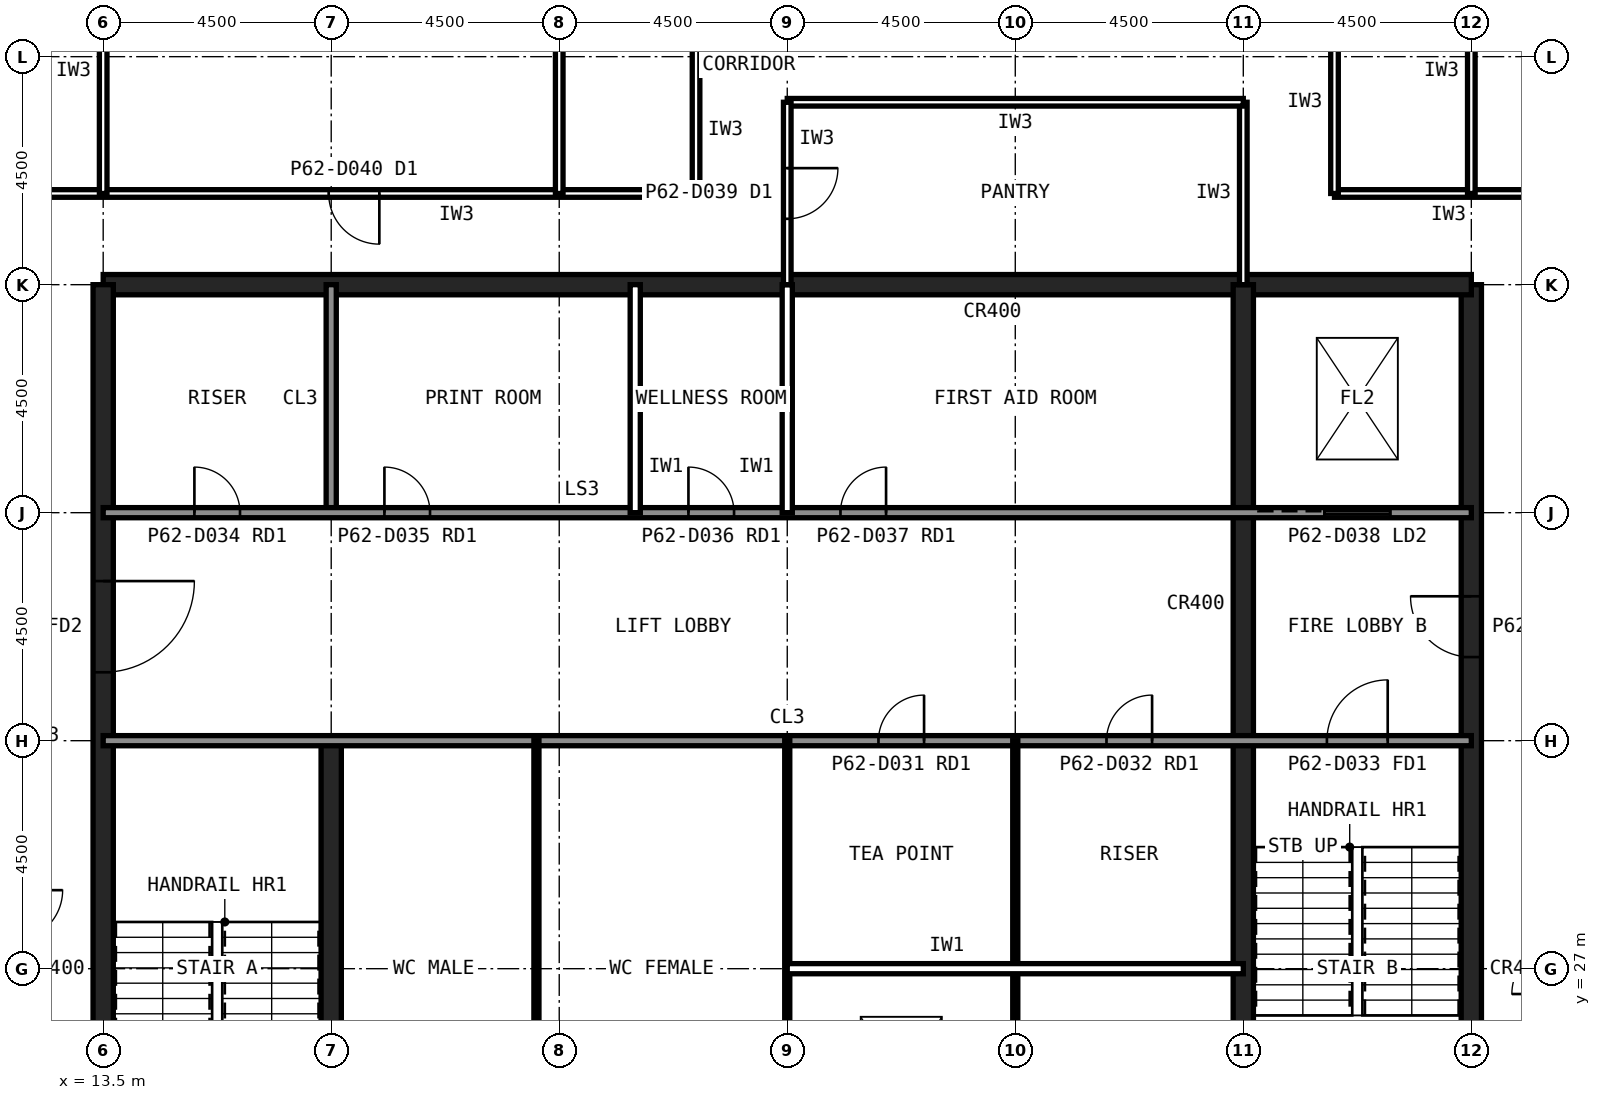
"""IFC4 building model, lengths in metres.
Left out: names, types, materials, properties, quantities, classifications, styles, units other than length and angle.
Written with IfcOpenShell. Run it as: python <this file> out.ifc"""

import sys

from ifc_helpers import new_model, si_unit, direction, frame, frame_2d, origin, place, context, subcontext, project, spatial, rectangle, extrude, element, fill, save


model = new_model("IFC4")
c1 = context("Model", 3, precision=1e-05, world=origin(), true_north=direction((0.0, 1.0)))
c2 = subcontext(c1, "Body", "Model", "MODEL_VIEW")
j1 = project(units=[si_unit("LENGTHUNIT", "METRE"), si_unit("PLANEANGLEUNIT", "RADIAN")], contexts=[c1])
p1 = place(None, origin())
s1 = spatial("IfcSite", under=j1, at=p1, CompositionType="ELEMENT")
p2 = place(p1, origin())
s2 = spatial("IfcBuilding", under=s1, at=p2, CompositionType="ELEMENT")
p3 = place(p2, frame((0.0, 0.0, 262.6)))
s3 = spatial("IfcBuildingStorey", under=s2, at=p3, CompositionType="ELEMENT", Elevation=262.6)
p4 = place(p3, frame((40.5, 13.5, 0.0), z_axis=(0.0, 0.0, 1.0), x_axis=(0.0, 1.0, 0.0)))
e1 = element("IfcWall", 1, at=p4, inside=s3, PredefinedType="SHEAR", context=c2, shape_type="SweptSolid", body=[
    extrude(rectangle(XDim=27.0, YDim=0.4, at=frame_2d((13.5, 0.0))), origin(), (0.0, 0.0, 1.0), 4.0),
])
p5 = place(p4, frame((5.85, 0.0, 0.0)))
e2 = element("IfcOpeningElement", 2, at=p5, cuts=e1, PredefinedType="OPENING", context=c2, shape_type="SweptSolid", body=[
    extrude(rectangle(XDim=1.8, YDim=2.1, at=frame_2d((0.9, 1.05))), frame((0.0, 0.21, 0.0), z_axis=(0.0, -1.0, 0.0), x_axis=(1.0, 0.0, 0.0)), (0.0, 0.0, 1.0), 0.42),
])
p6 = place(p4, frame((19.65, 0.0, 0.0)))
e3 = element("IfcOpeningElement", 3, at=p6, cuts=e1, PredefinedType="OPENING", context=c2, shape_type="SweptSolid", body=[
    extrude(rectangle(XDim=1.2, YDim=2.1, at=frame_2d((0.6, 1.05))), frame((0.0, 0.21, 0.0), z_axis=(0.0, -1.0, 0.0), x_axis=(1.0, 0.0, 0.0)), (0.0, 0.0, 1.0), 0.42),
])
p7 = place(p3, frame((40.5, 40.5, 0.0), z_axis=(0.0, 0.0, 1.0), x_axis=(-1.0, 0.0, 0.0)))
e4 = element("IfcWall", 4, at=p7, inside=s3, PredefinedType="SHEAR", context=c2, shape_type="SweptSolid", body=[
    extrude(rectangle(XDim=27.0, YDim=0.4, at=frame_2d((13.5, 0.0))), origin(), (0.0, 0.0, 1.0), 4.0),
])
p8 = place(p3, frame((13.5, 40.5, 0.0), z_axis=(0.0, 0.0, 1.0), x_axis=(0.0, -1.0, 0.0)))
e5 = element("IfcWall", 5, at=p8, inside=s3, PredefinedType="SHEAR", context=c2, shape_type="SweptSolid", body=[
    extrude(rectangle(XDim=27.0, YDim=0.4, at=frame_2d((13.5, 0.0))), origin(), (0.0, 0.0, 1.0), 4.0),
])
p9 = place(p8, frame((19.65, 0.0, 0.0)))
e6 = element("IfcOpeningElement", 6, at=p9, cuts=e5, PredefinedType="OPENING", context=c2, shape_type="SweptSolid", body=[
    extrude(rectangle(XDim=1.2, YDim=2.1, at=frame_2d((0.6, 1.05))), frame((0.0, 0.21, 0.0), z_axis=(0.0, -1.0, 0.0), x_axis=(1.0, 0.0, 0.0)), (0.0, 0.0, 1.0), 0.42),
])
p10 = place(p8, frame((5.85, 0.0, 0.0)))
e7 = element("IfcOpeningElement", 7, at=p10, cuts=e5, PredefinedType="OPENING", context=c2, shape_type="SweptSolid", body=[
    extrude(rectangle(XDim=1.8, YDim=2.1, at=frame_2d((0.9, 1.05))), frame((0.0, 0.21, 0.0), z_axis=(0.0, -1.0, 0.0), x_axis=(1.0, 0.0, 0.0)), (0.0, 0.0, 1.0), 0.42),
])
p11 = place(p3, frame((18.0, 13.5, 0.0), z_axis=(0.0, 0.0, 1.0), x_axis=(0.0, 1.0, 0.0)))
e8 = element("IfcWall", 8, at=p11, inside=s3, PredefinedType="SHEAR", context=c2, shape_type="SweptSolid", body=[
    extrude(rectangle(XDim=18.0, YDim=0.4, at=frame_2d((9.0, 0.0))), origin(), (0.0, 0.0, 1.0), 4.0),
])
p12 = place(p3, frame((18.0, 36.0, 0.0), z_axis=(0.0, 0.0, 1.0), x_axis=(0.0, 1.0, 0.0)))
e9 = element("IfcWall", 9, at=p12, inside=s3, PredefinedType="SOLIDWALL", context=c2, shape_type="SweptSolid", body=[
    extrude(rectangle(XDim=4.5, YDim=0.2, at=frame_2d((2.25, 0.0))), origin(), (0.0, 0.0, 1.0), 3.84),
])
p13 = place(p3, frame((36.0, 22.5, 0.0), z_axis=(0.0, 0.0, 1.0), x_axis=(0.0, 1.0, 0.0)))
e10 = element("IfcWall", 10, at=p13, inside=s3, PredefinedType="SHEAR", context=c2, shape_type="SweptSolid", body=[
    extrude(rectangle(XDim=18.0, YDim=0.4, at=frame_2d((9.0, 0.0))), origin(), (0.0, 0.0, 1.0), 4.0),
])
p14 = place(p3, frame((13.5, 36.0, 0.0), z_axis=(0.0, 0.0, 1.0), x_axis=(1.0, 0.0, 0.0)))
e11 = element("IfcWall", 11, at=p14, inside=s3, PredefinedType="SOLIDWALL", context=c2, shape_type="SweptSolid", body=[
    extrude(rectangle(XDim=27.0, YDim=0.2, at=frame_2d((13.5, 0.0))), origin(), (0.0, 0.0, 1.0), 3.84),
])
p15 = place(p14, frame((1.8, 0.0, 0.0)))
e12 = element("IfcOpeningElement", 12, at=p15, cuts=e11, PredefinedType="OPENING", context=c2, shape_type="SweptSolid", body=[
    extrude(rectangle(XDim=0.9, YDim=2.1, at=frame_2d((0.45, 1.05))), frame((0.0, 0.11, 0.0), z_axis=(0.0, -1.0, 0.0), x_axis=(1.0, 0.0, 0.0)), (0.0, 0.0, 1.0), 0.22),
])
p16 = place(p14, frame((5.55, 0.0, 0.0)))
e13 = element("IfcOpeningElement", 13, at=p16, cuts=e11, PredefinedType="OPENING", context=c2, shape_type="SweptSolid", body=[
    extrude(rectangle(XDim=0.9, YDim=2.1, at=frame_2d((0.45, 1.05))), frame((0.0, 0.11, 0.0), z_axis=(0.0, -1.0, 0.0), x_axis=(1.0, 0.0, 0.0)), (0.0, 0.0, 1.0), 0.22),
])
p17 = place(p14, frame((11.55, 0.0, 0.0)))
e14 = element("IfcOpeningElement", 14, at=p17, cuts=e11, PredefinedType="OPENING", context=c2, shape_type="SweptSolid", body=[
    extrude(rectangle(XDim=0.9, YDim=2.1, at=frame_2d((0.45, 1.05))), frame((0.0, 0.11, 0.0), z_axis=(0.0, -1.0, 0.0), x_axis=(1.0, 0.0, 0.0)), (0.0, 0.0, 1.0), 0.22),
])
p18 = place(p14, frame((14.55, 0.0, 0.0)))
e15 = element("IfcOpeningElement", 15, at=p18, cuts=e11, PredefinedType="OPENING", context=c2, shape_type="SweptSolid", body=[
    extrude(rectangle(XDim=0.9, YDim=2.1, at=frame_2d((0.45, 1.05))), frame((0.0, 0.11, 0.0), z_axis=(0.0, -1.0, 0.0), x_axis=(1.0, 0.0, 0.0)), (0.0, 0.0, 1.0), 0.22),
])
p19 = place(p14, frame((24.1, 0.0, 0.0)))
e16 = element("IfcOpeningElement", 16, at=p19, cuts=e11, PredefinedType="OPENING", context=c2, shape_type="SweptSolid", body=[
    extrude(rectangle(XDim=1.3, YDim=2.2, at=frame_2d((0.65, 1.1))), frame((0.0, 0.11, 0.0), z_axis=(0.0, -1.0, 0.0), x_axis=(1.0, 0.0, 0.0)), (0.0, 0.0, 1.0), 0.22),
])
p20 = place(p3, frame((13.5, 31.5, 0.0), z_axis=(0.0, 0.0, 1.0), x_axis=(1.0, 0.0, 0.0)))
e17 = element("IfcWall", 17, at=p20, inside=s3, PredefinedType="SOLIDWALL", context=c2, shape_type="SweptSolid", body=[
    extrude(rectangle(XDim=27.0, YDim=0.2, at=frame_2d((13.5, 0.0))), origin(), (0.0, 0.0, 1.0), 3.84),
])
p21 = place(p20, frame((24.15, 0.0, 0.0)))
e18 = element("IfcOpeningElement", 18, at=p21, cuts=e17, PredefinedType="OPENING", context=c2, shape_type="SweptSolid", body=[
    extrude(rectangle(XDim=1.2, YDim=2.1, at=frame_2d((0.6, 1.05))), frame((0.0, 0.11, 0.0), z_axis=(0.0, -1.0, 0.0), x_axis=(1.0, 0.0, 0.0)), (0.0, 0.0, 1.0), 0.22),
])
p22 = place(p20, frame((15.3, 0.0, 0.0)))
e19 = element("IfcOpeningElement", 19, at=p22, cuts=e17, PredefinedType="OPENING", context=c2, shape_type="SweptSolid", body=[
    extrude(rectangle(XDim=0.9, YDim=2.1, at=frame_2d((0.45, 1.05))), frame((0.0, 0.11, 0.0), z_axis=(0.0, -1.0, 0.0), x_axis=(1.0, 0.0, 0.0)), (0.0, 0.0, 1.0), 0.22),
])
p23 = place(p20, frame((19.8, 0.0, 0.0)))
e20 = element("IfcOpeningElement", 20, at=p23, cuts=e17, PredefinedType="OPENING", context=c2, shape_type="SweptSolid", body=[
    extrude(rectangle(XDim=0.9, YDim=2.1, at=frame_2d((0.45, 1.05))), frame((0.0, 0.11, 0.0), z_axis=(0.0, -1.0, 0.0), x_axis=(1.0, 0.0, 0.0)), (0.0, 0.0, 1.0), 0.22),
])
for number, where, z_axis, x_axis in (
    (21, (24.0, 36.0, 0.0), (0.0, 0.0, 1.0), (0.0, 1.0, 0.0)),
    (22, (27.0, 36.0, 0.0), (0.0, 0.0, 1.0), (0.0, 1.0, 0.0)),
):
    element("IfcWall", number, at=place(p3, frame(where, z_axis=z_axis, x_axis=x_axis)), inside=s3, PredefinedType="PARTITIONING", context=c2, shape_type="SweptSolid", body=[
        extrude(rectangle(XDim=4.5, YDim=0.2, at=frame_2d((2.25, 0.0))), origin(), (0.0, 0.0, 1.0), 3.84),
    ])
for number, where, z_axis, x_axis in (
    (23, (22.05, 22.5, 0.0), (0.0, 0.0, 1.0), (0.0, 1.0, 0.0)),
    (24, (27.0, 22.5, 0.0), (0.0, 0.0, 1.0), (0.0, 1.0, 0.0)),
    (25, (31.5, 22.5, 0.0), (0.0, 0.0, 1.0), (0.0, 1.0, 0.0)),
):
    element("IfcWall", number, at=place(p3, frame(where, z_axis=z_axis, x_axis=x_axis)), inside=s3, PredefinedType="PLUMBINGWALL", context=c2, shape_type="SweptSolid", body=[
        extrude(rectangle(XDim=9.0, YDim=0.1, at=frame_2d((4.5, 0.0))), origin(), (0.0, 0.0, 1.0), 3.84),
    ])
p24 = place(p3, frame((27.0, 27.0, 0.0), z_axis=(0.0, 0.0, 1.0), x_axis=(1.0, 0.0, 0.0)))
e26 = element("IfcWall", 26, at=p24, inside=s3, PredefinedType="PARTITIONING", context=c2, shape_type="SweptSolid", body=[
    extrude(rectangle(XDim=9.0, YDim=0.2, at=frame_2d((4.5, 0.0))), origin(), (0.0, 0.0, 1.0), 3.84),
])
p25 = place(p3, frame((25.2, 42.3, 0.0), z_axis=(0.0, 0.0, 1.0), x_axis=(-1.0, 0.0, 0.0)))
e27 = element("IfcWall", 27, at=p25, inside=s3, PredefinedType="PARTITIONING", context=c2, shape_type="SweptSolid", body=[
    extrude(rectangle(XDim=13.5, YDim=0.15, at=frame_2d((6.75, 0.0))), origin(), (0.0, 0.0, 1.0), 3.84),
])
p26 = place(p25, frame((6.25, 0.0, 0.0)))
e28 = element("IfcOpeningElement", 28, at=p26, cuts=e27, PredefinedType="OPENING", context=c2, shape_type="SweptSolid", body=[
    extrude(rectangle(XDim=1.0, YDim=2.1, at=frame_2d((0.5, 1.05))), frame((0.0, 0.085, 0.0), z_axis=(0.0, -1.0, 0.0), x_axis=(1.0, 0.0, 0.0)), (0.0, 0.0, 1.0), 0.17),
])
p27 = place(p3, frame((42.3, 42.3, 0.0), z_axis=(0.0, 0.0, 1.0), x_axis=(-1.0, 0.0, 0.0)))
e29 = element("IfcWall", 29, at=p27, inside=s3, PredefinedType="PARTITIONING", context=c2, shape_type="SweptSolid", body=[
    extrude(rectangle(XDim=4.5, YDim=0.15, at=frame_2d((2.25, 0.0))), origin(), (0.0, 0.0, 1.0), 3.84),
])
for number, where, z_axis, x_axis in (
    (30, (25.2, 45.9, 0.0), (0.0, 0.0, 1.0), (0.0, -1.0, 0.0)),
    (31, (37.8, 42.3, 0.0), (0.0, 0.0, 1.0), (0.0, 1.0, 0.0)),
):
    element("IfcWall", number, at=place(p3, frame(where, z_axis=z_axis, x_axis=x_axis)), inside=s3, PredefinedType="PARTITIONING", context=c2, shape_type="SweptSolid", body=[
        extrude(rectangle(XDim=3.6, YDim=0.15, at=frame_2d((1.8, 0.0))), origin(), (0.0, 0.0, 1.0), 3.84),
    ])
p28 = place(p3, frame((36.0, 40.5, 0.0), z_axis=(0.0, 0.0, 1.0), x_axis=(0.0, 1.0, 0.0)))
e32 = element("IfcWall", 32, at=p28, inside=s3, PredefinedType="PARTITIONING", context=c2, shape_type="SweptSolid", body=[
    extrude(rectangle(XDim=3.6, YDim=0.15, at=frame_2d((1.8, 0.0))), origin(), (0.0, 0.0, 1.0), 2.989),
])
p29 = place(p3, frame((36.0, 44.1, 0.0), z_axis=(0.0, 0.0, 1.0), x_axis=(-1.0, 0.0, 0.0)))
e33 = element("IfcWall", 33, at=p29, inside=s3, PredefinedType="PARTITIONING", context=c2, shape_type="SweptSolid", body=[
    extrude(rectangle(XDim=9.0, YDim=0.15, at=frame_2d((4.5, 0.0))), origin(), (0.0, 0.0, 1.0), 3.84),
])
p30 = place(p3, frame((27.0, 44.1, 0.0), z_axis=(0.0, 0.0, 1.0), x_axis=(0.0, -1.0, 0.0)))
e34 = element("IfcWall", 34, at=p30, inside=s3, PredefinedType="PARTITIONING", context=c2, shape_type="SweptSolid", body=[
    extrude(rectangle(XDim=3.6, YDim=0.15, at=frame_2d((1.8, 0.0))), origin(), (0.0, 0.0, 1.0), 2.989),
])
p31 = place(p30, frame((1.3, 0.0, 0.0)))
e35 = element("IfcOpeningElement", 35, at=p31, cuts=e34, PredefinedType="OPENING", context=c2, shape_type="SweptSolid", body=[
    extrude(rectangle(XDim=1.0, YDim=2.1, at=frame_2d((0.5, 1.05))), frame((0.0, 0.085, 0.0), z_axis=(0.0, -1.0, 0.0), x_axis=(1.0, 0.0, 0.0)), (0.0, 0.0, 1.0), 0.17),
])
p32 = place(p3, frame((22.5, 49.5, 0.0), z_axis=(0.0, 0.0, 1.0), x_axis=(0.0, -1.0, 0.0)))
e36 = element("IfcWall", 36, at=p32, inside=s3, PredefinedType="PARTITIONING", context=c2, shape_type="SweptSolid", body=[
    extrude(rectangle(XDim=7.2, YDim=0.15, at=frame_2d((3.6, 0.0))), origin(), (0.0, 0.0, 1.0), 2.989),
])
p33 = place(p32, frame((3.1, 0.0, 0.0)))
e37 = element("IfcOpeningElement", 37, at=p33, cuts=e36, PredefinedType="OPENING", context=c2, shape_type="SweptSolid", body=[
    extrude(rectangle(XDim=1.0, YDim=2.1, at=frame_2d((0.5, 1.05))), frame((0.0, 0.085, 0.0), z_axis=(0.0, -1.0, 0.0), x_axis=(1.0, 0.0, 0.0)), (0.0, 0.0, 1.0), 0.17),
])
p34 = place(p3, frame((13.5, 42.3, 0.0), z_axis=(0.0, 0.0, 1.0), x_axis=(0.0, 1.0, 0.0)))
e38 = element("IfcWall", 38, at=p34, inside=s3, PredefinedType="PARTITIONING", context=c2, shape_type="SweptSolid", body=[
    extrude(rectangle(XDim=6.88, YDim=0.15, at=frame_2d((3.44, 0.0))), origin(), (0.0, 0.0, 1.0), 2.989),
])
p35 = place(p34, frame((2.94, 0.0, 0.0)))
e39 = element("IfcOpeningElement", 39, at=p35, cuts=e38, PredefinedType="OPENING", context=c2, shape_type="SweptSolid", body=[
    extrude(rectangle(XDim=1.0, YDim=2.1, at=frame_2d((0.5, 1.05))), frame((0.0, 0.085, 0.0), z_axis=(0.0, -1.0, 0.0), x_axis=(1.0, 0.0, 0.0)), (0.0, 0.0, 1.0), 0.17),
])
p36 = place(p3, frame((40.5, 42.3, 0.0), z_axis=(0.0, 0.0, 1.0), x_axis=(0.0, 1.0, 0.0)))
e40 = element("IfcWall", 40, at=p36, inside=s3, PredefinedType="PARTITIONING", context=c2, shape_type="SweptSolid", body=[
    extrude(rectangle(XDim=6.88, YDim=0.15, at=frame_2d((3.44, 0.0))), origin(), (0.0, 0.0, 1.0), 2.989),
])
p37 = place(p36, frame((2.94, 0.0, 0.0)))
e41 = element("IfcOpeningElement", 41, at=p37, cuts=e40, PredefinedType="OPENING", context=c2, shape_type="SweptSolid", body=[
    extrude(rectangle(XDim=1.0, YDim=2.1, at=frame_2d((0.5, 1.05))), frame((0.0, 0.085, 0.0), z_axis=(0.0, -1.0, 0.0), x_axis=(1.0, 0.0, 0.0)), (0.0, 0.0, 1.0), 0.17),
])
p38 = place(p10, origin())
e42 = element("IfcDoor", 42, at=p38, inside=s3, OperationType="SINGLE_SWING_LEFT", PredefinedType="DOOR", context=c2, shape_type="SweptSolid", body=[
    extrude(rectangle(XDim=1.8, YDim=2.1, at=frame_2d((0.9, 1.05))), frame((0.0, 0.025, 0.0), z_axis=(0.0, -1.0, 0.0), x_axis=(1.0, 0.0, 0.0)), (0.0, 0.0, 1.0), 0.05),
])
fill(e7, e42)
p39 = place(p6, origin())
e43 = element("IfcDoor", 43, at=p39, inside=s3, OperationType="SINGLE_SWING_RIGHT", PredefinedType="DOOR", context=c2, shape_type="SweptSolid", body=[
    extrude(rectangle(XDim=1.2, YDim=2.1, at=frame_2d((0.6, 1.05))), frame((0.0, 0.025, 0.0), z_axis=(0.0, -1.0, 0.0), x_axis=(1.0, 0.0, 0.0)), (0.0, 0.0, 1.0), 0.05),
])
fill(e3, e43)
p40 = place(p21, origin())
e44 = element("IfcDoor", 44, at=p40, inside=s3, OperationType="SINGLE_SWING_RIGHT", PredefinedType="DOOR", context=c2, shape_type="SweptSolid", body=[
    extrude(rectangle(XDim=1.2, YDim=2.1, at=frame_2d((0.6, 1.05))), frame((0.0, 0.025, 0.0), z_axis=(0.0, -1.0, 0.0), x_axis=(1.0, 0.0, 0.0)), (0.0, 0.0, 1.0), 0.05),
])
fill(e18, e44)
p41 = place(p22, origin())
e45 = element("IfcDoor", 45, at=p41, inside=s3, OperationType="SINGLE_SWING_RIGHT", PredefinedType="DOOR", context=c2, shape_type="SweptSolid", body=[
    extrude(rectangle(XDim=0.9, YDim=2.1, at=frame_2d((0.45, 1.05))), frame((0.0, 0.025, 0.0), z_axis=(0.0, -1.0, 0.0), x_axis=(1.0, 0.0, 0.0)), (0.0, 0.0, 1.0), 0.05),
])
fill(e19, e45)
p42 = place(p23, origin())
e46 = element("IfcDoor", 46, at=p42, inside=s3, OperationType="SINGLE_SWING_RIGHT", PredefinedType="DOOR", context=c2, shape_type="SweptSolid", body=[
    extrude(rectangle(XDim=0.9, YDim=2.1, at=frame_2d((0.45, 1.05))), frame((0.0, 0.025, 0.0), z_axis=(0.0, -1.0, 0.0), x_axis=(1.0, 0.0, 0.0)), (0.0, 0.0, 1.0), 0.05),
])
fill(e20, e46)
p43 = place(p15, origin())
e47 = element("IfcDoor", 47, at=p43, inside=s3, OperationType="SINGLE_SWING_LEFT", PredefinedType="DOOR", context=c2, shape_type="SweptSolid", body=[
    extrude(rectangle(XDim=0.9, YDim=2.1, at=frame_2d((0.45, 1.05))), frame((0.0, 0.025, 0.0), z_axis=(0.0, -1.0, 0.0), x_axis=(1.0, 0.0, 0.0)), (0.0, 0.0, 1.0), 0.05),
])
fill(e12, e47)
p44 = place(p16, origin())
e48 = element("IfcDoor", 48, at=p44, inside=s3, OperationType="SINGLE_SWING_LEFT", PredefinedType="DOOR", context=c2, shape_type="SweptSolid", body=[
    extrude(rectangle(XDim=0.9, YDim=2.1, at=frame_2d((0.45, 1.05))), frame((0.0, 0.025, 0.0), z_axis=(0.0, -1.0, 0.0), x_axis=(1.0, 0.0, 0.0)), (0.0, 0.0, 1.0), 0.05),
])
fill(e13, e48)
p45 = place(p17, origin())
e49 = element("IfcDoor", 49, at=p45, inside=s3, OperationType="SINGLE_SWING_LEFT", PredefinedType="DOOR", context=c2, shape_type="SweptSolid", body=[
    extrude(rectangle(XDim=0.9, YDim=2.1, at=frame_2d((0.45, 1.05))), frame((0.0, 0.025, 0.0), z_axis=(0.0, -1.0, 0.0), x_axis=(1.0, 0.0, 0.0)), (0.0, 0.0, 1.0), 0.05),
])
fill(e14, e49)
p46 = place(p18, origin())
e50 = element("IfcDoor", 50, at=p46, inside=s3, OperationType="SINGLE_SWING_RIGHT", PredefinedType="DOOR", context=c2, shape_type="SweptSolid", body=[
    extrude(rectangle(XDim=0.9, YDim=2.1, at=frame_2d((0.45, 1.05))), frame((0.0, 0.025, 0.0), z_axis=(0.0, -1.0, 0.0), x_axis=(1.0, 0.0, 0.0)), (0.0, 0.0, 1.0), 0.05),
])
fill(e15, e50)
p47 = place(p19, origin())
e51 = element("IfcDoor", 51, at=p47, inside=s3, OperationType="SLIDING_TO_LEFT", PredefinedType="DOOR", context=c2, shape_type="SweptSolid", body=[
    extrude(rectangle(XDim=1.3, YDim=2.2, at=frame_2d((0.65, 1.1))), frame((0.0, 0.025, 0.0), z_axis=(0.0, -1.0, 0.0), x_axis=(1.0, 0.0, 0.0)), (0.0, 0.0, 1.0), 0.05),
])
fill(e16, e51)
p48 = place(p26, origin())
e52 = element("IfcDoor", 52, at=p48, inside=s3, OperationType="SINGLE_SWING_LEFT", PredefinedType="DOOR", context=c2, shape_type="SweptSolid", body=[
    extrude(rectangle(XDim=1.0, YDim=2.1, at=frame_2d((0.5, 1.05))), frame((0.0, 0.025, 0.0), z_axis=(0.0, -1.0, 0.0), x_axis=(1.0, 0.0, 0.0)), (0.0, 0.0, 1.0), 0.05),
])
fill(e28, e52)
p49 = place(p31, origin())
e53 = element("IfcDoor", 53, at=p49, inside=s3, OperationType="SINGLE_SWING_LEFT", PredefinedType="DOOR", context=c2, shape_type="SweptSolid", body=[
    extrude(rectangle(XDim=1.0, YDim=2.1, at=frame_2d((0.5, 1.05))), frame((0.0, 0.025, 0.0), z_axis=(0.0, -1.0, 0.0), x_axis=(1.0, 0.0, 0.0)), (0.0, 0.0, 1.0), 0.05),
])
fill(e35, e53)
save(model, sys.argv[1])
